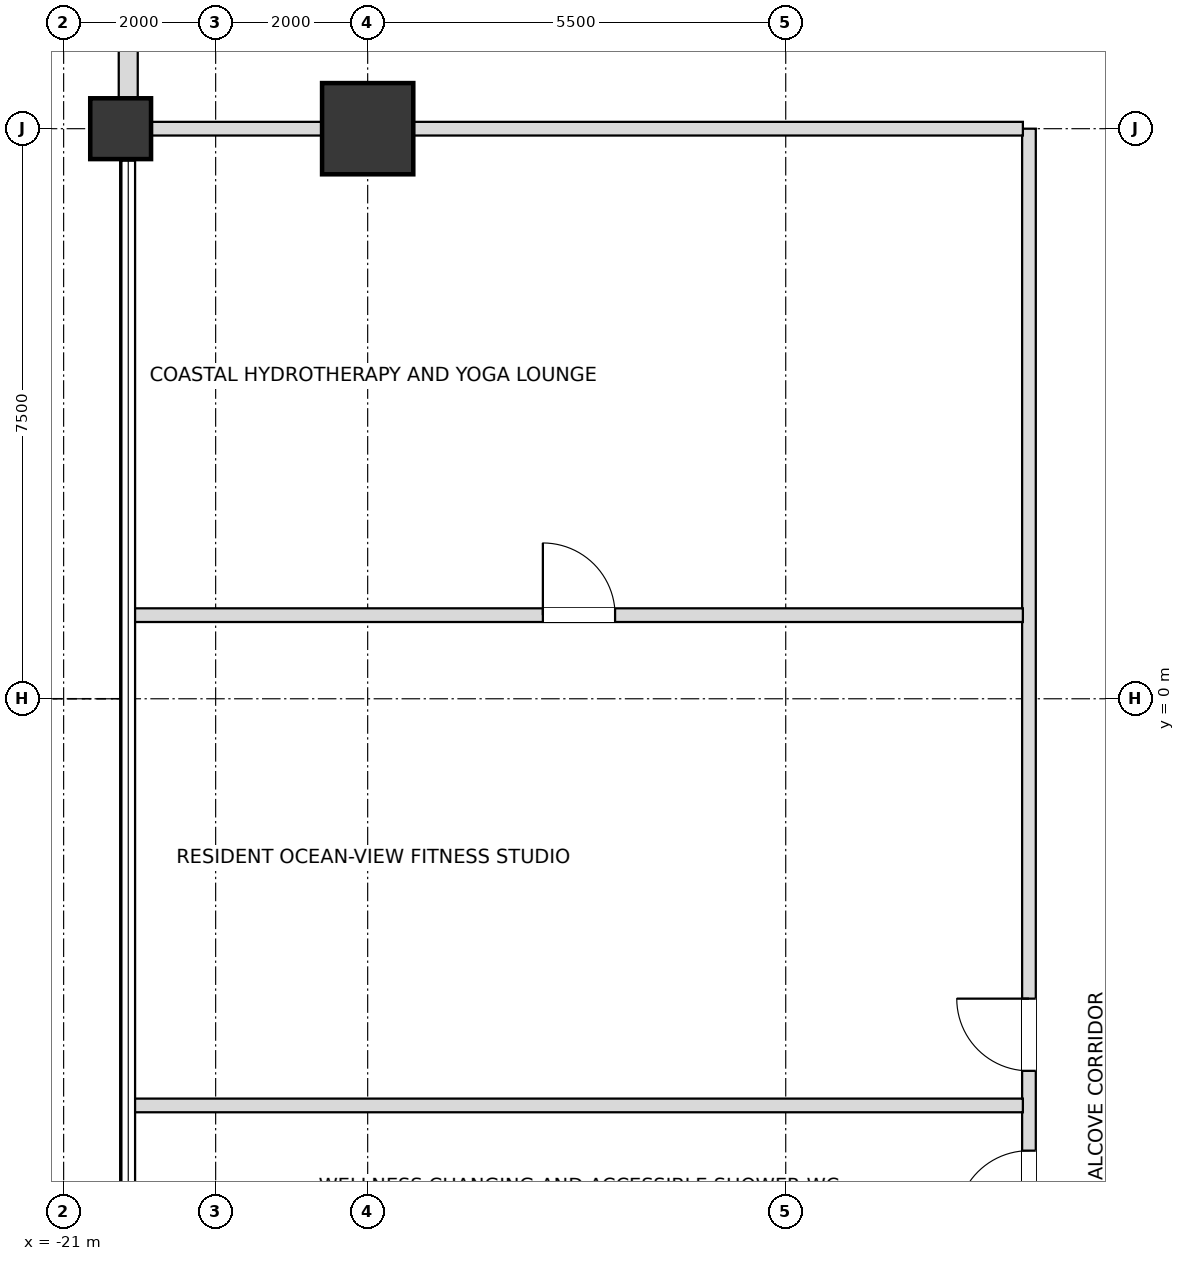
"""IFC4 building model, lengths in metres.
Left out: names, types, materials, properties, quantities, classifications, styles, units other than length and angle.
Written with IfcOpenShell. Run it as: python <this file> out.ifc"""

import sys

from ifc_helpers import new_model, si_unit, direction, frame, frame_2d, origin, origin_2d, place, context, subcontext, project, spatial, rectangle, extrude, element, fill, save


model = new_model("IFC4")
c1 = context("Model", 3, precision=1e-05, world=origin(), true_north=direction((0.0, 1.0)))
c2 = subcontext(c1, "Body", "Model", "MODEL_VIEW")
j1 = project(units=[si_unit("LENGTHUNIT", "METRE"), si_unit("PLANEANGLEUNIT", "RADIAN")], contexts=[c1])
p1 = place(None, origin())
s1 = spatial("IfcSite", under=j1, at=p1, CompositionType="ELEMENT")
p2 = place(p1, origin())
s2 = spatial("IfcBuilding", under=s1, at=p2, CompositionType="ELEMENT")
p3 = place(p2, frame((0.0, 0.0, 154.8)))
s3 = spatial("IfcBuildingStorey", under=s2, at=p3, CompositionType="ELEMENT", Elevation=154.8)
p4 = place(p3, frame((-17.0, 7.5, 0.0), z_axis=(0.0, 0.0, 1.0), x_axis=(1.0, 0.0, 0.0)))
e1 = element("IfcColumn", 1, at=p4, inside=s3, PredefinedType="USERDEFINED", context=c2, shape_type="SweptSolid", body=[
    extrude(rectangle(XDim=1.2, YDim=1.2, at=origin_2d()), origin(), (0.0, 0.0, 1.0), 3.6),
])
p5 = place(p3, frame((-20.25, 7.5, 0.0), z_axis=(0.0, 0.0, 1.0), x_axis=(1.0, 0.0, 0.0)))
e2 = element("IfcColumn", 2, at=p5, inside=s3, PredefinedType="COLUMN", context=c2, shape_type="SweptSolid", body=[
    extrude(rectangle(XDim=0.8, YDim=0.8, at=origin_2d()), origin(), (0.0, 0.0, 1.0), 3.6),
])
p6 = place(p3, frame((-20.15, 12.605, 0.0), z_axis=(0.0, 0.0, 1.0), x_axis=(0.0, -1.0, 0.0)))
e3 = element("IfcWall", 3, at=p6, inside=s3, PredefinedType="SOLIDWALL", context=c2, shape_type="SweptSolid", body=[
    extrude(rectangle(XDim=4.71, YDim=0.25, at=frame_2d((2.355, 0.0))), origin(), (0.0, 0.0, 1.0), 2.736),
])
p7 = place(p6, frame((1.455, 0.0, 0.72)))
e4 = element("IfcOpeningElement", 4, at=p7, cuts=e3, PredefinedType="OPENING", context=c2, shape_type="SweptSolid", body=[
    extrude(rectangle(XDim=1.8, YDim=1.68, at=frame_2d((0.9, 0.84))), frame((0.0, 0.135, 0.0), z_axis=(0.0, -1.0, 0.0), x_axis=(1.0, 0.0, 0.0)), (0.0, 0.0, 1.0), 0.27),
])
p8 = place(p3, frame((-8.3, -7.5, 0.0), z_axis=(0.0, 0.0, 1.0), x_axis=(0.0, 1.0, 0.0)))
e5 = element("IfcWall", 5, at=p8, inside=s3, PredefinedType="PARTITIONING", context=c2, shape_type="SweptSolid", body=[
    extrude(rectangle(XDim=15.0, YDim=0.18, at=frame_2d((7.5, 0.0))), origin(), (0.0, 0.0, 1.0), 3.38),
])
p9 = place(p8, frame((0.605, 0.0, 0.0)))
e6 = element("IfcOpeningElement", 6, at=p9, cuts=e5, PredefinedType="OPENING", context=c2, shape_type="SweptSolid", body=[
    extrude(rectangle(XDim=0.95, YDim=2.15, at=frame_2d((0.475, 1.075))), frame((0.0, 0.1, 0.0), z_axis=(0.0, -1.0, 0.0), x_axis=(1.0, 0.0, 0.0)), (0.0, 0.0, 1.0), 0.2),
])
p10 = place(p8, frame((2.605, 0.0, 0.0)))
e7 = element("IfcOpeningElement", 7, at=p10, cuts=e5, PredefinedType="OPENING", context=c2, shape_type="SweptSolid", body=[
    extrude(rectangle(XDim=0.95, YDim=2.15, at=frame_2d((0.475, 1.075))), frame((0.0, 0.1, 0.0), z_axis=(0.0, -1.0, 0.0), x_axis=(1.0, 0.0, 0.0)), (0.0, 0.0, 1.0), 0.2),
])
p11 = place(p3, frame((-20.07, -5.35, 0.0), z_axis=(0.0, 0.0, 1.0), x_axis=(1.0, 0.0, 0.0)))
e8 = element("IfcWall", 8, at=p11, inside=s3, PredefinedType="PARTITIONING", context=c2, shape_type="SweptSolid", body=[
    extrude(rectangle(XDim=11.69, YDim=0.18, at=frame_2d((5.845, 0.0))), origin(), (0.0, 0.0, 1.0), 2.816),
])
p12 = place(p3, frame((-20.07, 1.1, 0.0), z_axis=(0.0, 0.0, 1.0), x_axis=(1.0, 0.0, 0.0)))
e9 = element("IfcWall", 9, at=p12, inside=s3, PredefinedType="PARTITIONING", context=c2, shape_type="SweptSolid", body=[
    extrude(rectangle(XDim=11.69, YDim=0.18, at=frame_2d((5.845, 0.0))), origin(), (0.0, 0.0, 1.0), 2.816),
])
p13 = place(p12, frame((5.375, 0.0, 0.0)))
e10 = element("IfcOpeningElement", 10, at=p13, cuts=e9, PredefinedType="OPENING", context=c2, shape_type="SweptSolid", body=[
    extrude(rectangle(XDim=0.95, YDim=2.15, at=frame_2d((0.475, 1.075))), frame((0.0, 0.1, 0.0), z_axis=(0.0, -1.0, 0.0), x_axis=(1.0, 0.0, 0.0)), (0.0, 0.0, 1.0), 0.2),
])
p14 = place(p3, frame((-20.15, 7.5, 0.0), z_axis=(0.0, 0.0, 1.0), x_axis=(1.0, 0.0, 0.0)))
e11 = element("IfcWall", 11, at=p14, inside=s3, PredefinedType="PARTITIONING", context=c2, shape_type="SweptSolid", body=[
    extrude(rectangle(XDim=11.77, YDim=0.18, at=frame_2d((5.885, 0.0))), origin(), (0.0, 0.0, 1.0), 2.816),
])
p15 = place(p9, origin())
e12 = element("IfcDoor", 12, at=p15, inside=s3, OperationType="SINGLE_SWING_LEFT", PredefinedType="DOOR", context=c2, shape_type="SweptSolid", body=[
    extrude(rectangle(XDim=0.95, YDim=2.15, at=frame_2d((0.475, 1.075))), frame((0.0, 0.025, 0.0), z_axis=(0.0, -1.0, 0.0), x_axis=(1.0, 0.0, 0.0)), (0.0, 0.0, 1.0), 0.05),
])
fill(e6, e12)
p16 = place(p10, origin())
e13 = element("IfcDoor", 13, at=p16, inside=s3, OperationType="SINGLE_SWING_RIGHT", PredefinedType="DOOR", context=c2, shape_type="SweptSolid", body=[
    extrude(rectangle(XDim=0.95, YDim=2.15, at=frame_2d((0.475, 1.075))), frame((0.0, 0.025, 0.0), z_axis=(0.0, -1.0, 0.0), x_axis=(1.0, 0.0, 0.0)), (0.0, 0.0, 1.0), 0.05),
])
fill(e7, e13)
p17 = place(p13, origin())
e14 = element("IfcDoor", 14, at=p17, inside=s3, OperationType="SINGLE_SWING_LEFT", PredefinedType="DOOR", context=c2, shape_type="SweptSolid", body=[
    extrude(rectangle(XDim=0.95, YDim=2.15, at=frame_2d((0.475, 1.075))), frame((0.0, 0.025, 0.0), z_axis=(0.0, -1.0, 0.0), x_axis=(1.0, 0.0, 0.0)), (0.0, 0.0, 1.0), 0.05),
])
fill(e10, e14)
save(model, sys.argv[1])
